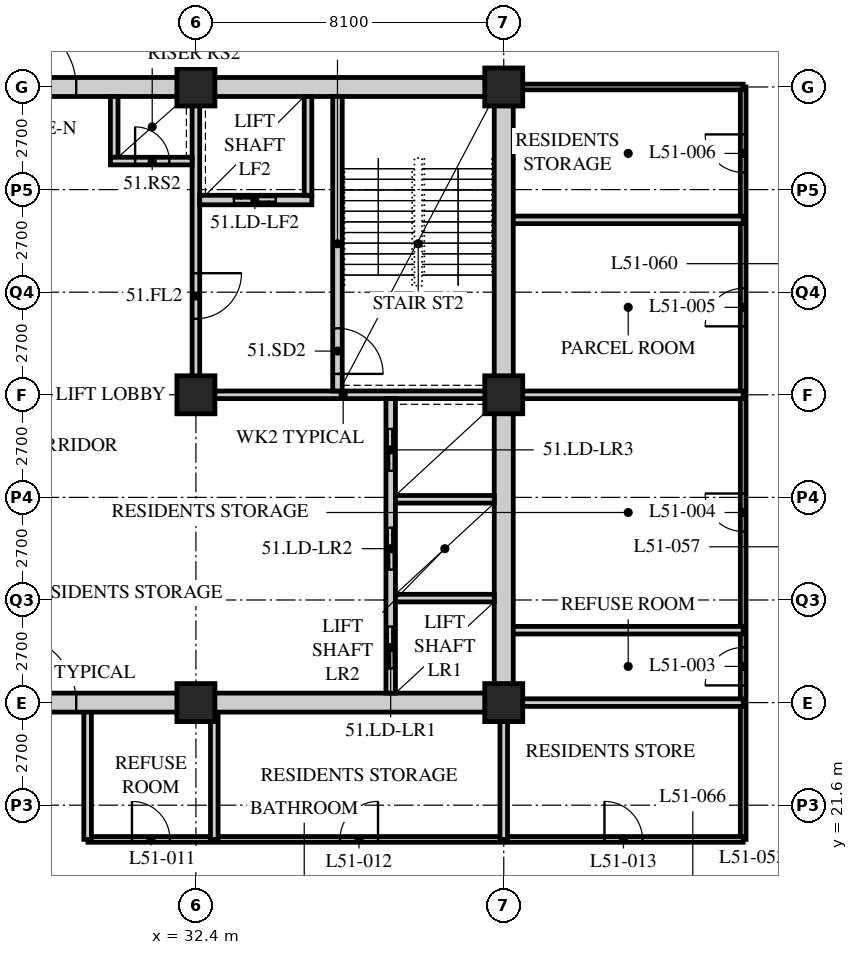
"""IFC4 building model, lengths in metres.
Left out: names, types, materials, properties, quantities, classifications, styles, units other than length and angle.
Written with IfcOpenShell. Run it as: python <this file> out.ifc"""

import sys

from ifc_helpers import new_model, si_unit, direction, frame, frame_2d, origin, origin_2d, place, context, subcontext, project, spatial, rectangle, hollow_rectangle, extrude, element, fill, save


model = new_model("IFC4")
c1 = context("Model", 3, precision=1e-05, world=origin(), true_north=direction((0.0, 1.0)))
c2 = subcontext(c1, "Body", "Model", "MODEL_VIEW")
j1 = project(units=[si_unit("LENGTHUNIT", "METRE"), si_unit("PLANEANGLEUNIT", "RADIAN")], contexts=[c1])
p1 = place(None, origin())
s1 = spatial("IfcSite", under=j1, at=p1, CompositionType="ELEMENT")
p2 = place(p1, origin())
s2 = spatial("IfcBuilding", under=s1, at=p2, CompositionType="ELEMENT")
p3 = place(p2, frame((0.0, 0.0, 199.2)))
s3 = spatial("IfcBuildingStorey", under=s2, at=p3, CompositionType="ELEMENT", Elevation=199.2)
for number, where, z_axis, x_axis in (
    (1, (32.4, 24.3, 0.0), (0.0, 0.0, 1.0), (1.0, 0.0, 0.0)),
    (2, (32.4, 32.4, 0.0), (0.0, 0.0, 1.0), (1.0, 0.0, 0.0)),
    (3, (32.4, 40.5, 0.0), (0.0, 0.0, 1.0), (1.0, 0.0, 0.0)),
    (4, (40.5, 24.3, 0.0), (0.0, 0.0, 1.0), (1.0, 0.0, 0.0)),
    (5, (40.5, 32.4, 0.0), (0.0, 0.0, 1.0), (1.0, 0.0, 0.0)),
    (6, (40.5, 40.5, 0.0), (0.0, 0.0, 1.0), (1.0, 0.0, 0.0)),
):
    element("IfcColumn", number, at=place(p3, frame(where, z_axis=z_axis, x_axis=x_axis)), inside=s3, PredefinedType="COLUMN", context=c2, shape_type="SweptSolid", body=[
        extrude(hollow_rectangle(XDim=1.0, YDim=1.0, WallThickness=0.1, at=origin_2d()), origin(), (0.0, 0.0, 1.0), 3.6),
    ])
p4 = place(p3, frame((46.8, 20.7, 0.0), z_axis=(0.0, 0.0, 1.0), x_axis=(0.0, 1.0, 0.0)))
e7 = element("IfcWall", 7, at=p4, inside=s3, PredefinedType="PARTITIONING", context=c2, shape_type="SweptSolid", body=[
    extrude(rectangle(XDim=19.8, YDim=0.15, at=frame_2d((9.9, 0.0))), origin(), (0.0, 0.0, 1.0), 3.39),
])
p5 = place(p4, frame((4.052, 0.0, 0.0)))
e8 = element("IfcOpeningElement", 8, at=p5, cuts=e7, PredefinedType="OPENING", context=c2, shape_type="SweptSolid", body=[
    extrude(rectangle(XDim=1.0, YDim=2.1, at=frame_2d((0.5, 1.05))), frame((0.0, 0.085, 0.0), z_axis=(0.0, -1.0, 0.0), x_axis=(1.0, 0.0, 0.0)), (0.0, 0.0, 1.0), 0.17),
])
p6 = place(p4, frame((8.102, 0.0, 0.0)))
e9 = element("IfcOpeningElement", 9, at=p6, cuts=e7, PredefinedType="OPENING", context=c2, shape_type="SweptSolid", body=[
    extrude(rectangle(XDim=1.0, YDim=2.1, at=frame_2d((0.5, 1.05))), frame((0.0, 0.085, 0.0), z_axis=(0.0, -1.0, 0.0), x_axis=(1.0, 0.0, 0.0)), (0.0, 0.0, 1.0), 0.17),
])
p7 = place(p4, frame((13.502, 0.0, 0.0)))
e10 = element("IfcOpeningElement", 10, at=p7, cuts=e7, PredefinedType="OPENING", context=c2, shape_type="SweptSolid", body=[
    extrude(rectangle(XDim=1.0, YDim=2.1, at=frame_2d((0.5, 1.05))), frame((0.0, 0.085, 0.0), z_axis=(0.0, -1.0, 0.0), x_axis=(1.0, 0.0, 0.0)), (0.0, 0.0, 1.0), 0.17),
])
p8 = place(p4, frame((17.552, 0.0, 0.0)))
e11 = element("IfcOpeningElement", 11, at=p8, cuts=e7, PredefinedType="OPENING", context=c2, shape_type="SweptSolid", body=[
    extrude(rectangle(XDim=1.0, YDim=2.1, at=frame_2d((0.5, 1.05))), frame((0.0, 0.085, 0.0), z_axis=(0.0, -1.0, 0.0), x_axis=(1.0, 0.0, 0.0)), (0.0, 0.0, 1.0), 0.17),
])
p9 = place(p3, frame((46.8, 40.5, 0.0), z_axis=(0.0, 0.0, 1.0), x_axis=(-1.0, 0.0, 0.0)))
e12 = element("IfcWall", 12, at=p9, inside=s3, PredefinedType="PARTITIONING", context=c2, shape_type="SweptSolid", body=[
    extrude(rectangle(XDim=6.1, YDim=0.15, at=frame_2d((3.05, 0.0))), origin(), (0.0, 0.0, 1.0), 3.39),
])
p10 = place(p3, frame((29.56, 20.7, 0.0), z_axis=(0.0, 0.0, 1.0), x_axis=(1.0, 0.0, 0.0)))
e13 = element("IfcWall", 13, at=p10, inside=s3, PredefinedType="PARTITIONING", context=c2, shape_type="SweptSolid", body=[
    extrude(rectangle(XDim=17.24, YDim=0.15, at=frame_2d((8.62, 0.0))), origin(), (0.0, 0.0, 1.0), 3.39),
])
p11 = place(p10, frame((1.157, 0.0, 0.0)))
e14 = element("IfcOpeningElement", 14, at=p11, cuts=e13, PredefinedType="OPENING", context=c2, shape_type="SweptSolid", body=[
    extrude(rectangle(XDim=1.0, YDim=2.1, at=frame_2d((0.5, 1.05))), frame((0.0, 0.085, 0.0), z_axis=(0.0, -1.0, 0.0), x_axis=(1.0, 0.0, 0.0)), (0.0, 0.0, 1.0), 0.17),
])
p12 = place(p10, frame((6.632, 0.0, 0.0)))
e15 = element("IfcOpeningElement", 15, at=p12, cuts=e13, PredefinedType="OPENING", context=c2, shape_type="SweptSolid", body=[
    extrude(rectangle(XDim=1.0, YDim=2.1, at=frame_2d((0.5, 1.05))), frame((0.0, 0.085, 0.0), z_axis=(0.0, -1.0, 0.0), x_axis=(1.0, 0.0, 0.0)), (0.0, 0.0, 1.0), 0.17),
])
p13 = place(p10, frame((13.59, 0.0, 0.0)))
e16 = element("IfcOpeningElement", 16, at=p13, cuts=e13, PredefinedType="OPENING", context=c2, shape_type="SweptSolid", body=[
    extrude(rectangle(XDim=1.0, YDim=2.1, at=frame_2d((0.5, 1.05))), frame((0.0, 0.085, 0.0), z_axis=(0.0, -1.0, 0.0), x_axis=(1.0, 0.0, 0.0)), (0.0, 0.0, 1.0), 0.17),
])
for number, where, z_axis, x_axis in (
    (17, (40.5, 32.4, 0.0), (0.0, 0.0, 1.0), (1.0, 0.0, 0.0)),
    (18, (46.8, 26.205, 0.0), (0.0, 0.0, 1.0), (-1.0, 0.0, 0.0)),
    (19, (46.8, 37.003, 0.0), (0.0, 0.0, 1.0), (-1.0, 0.0, 0.0)),
):
    element("IfcWall", number, at=place(p3, frame(where, z_axis=z_axis, x_axis=x_axis)), inside=s3, PredefinedType="SOLIDWALL", context=c2, shape_type="SweptSolid", body=[
        extrude(rectangle(XDim=6.3, YDim=0.2, at=frame_2d((3.15, 0.0))), origin(), (0.0, 0.0, 1.0), 3.39),
    ])
p14 = place(p3, frame((40.5, 20.7, 0.0), z_axis=(0.0, 0.0, 1.0), x_axis=(0.0, 1.0, 0.0)))
e20 = element("IfcWall", 20, at=p14, inside=s3, PredefinedType="SOLIDWALL", context=c2, shape_type="SweptSolid", body=[
    extrude(rectangle(XDim=3.6, YDim=0.2, at=frame_2d((1.8, 0.0))), origin(), (0.0, 0.0, 1.0), 2.778),
])
for number, where, z_axis, x_axis in (
    (21, (32.883, 20.7, 0.0), (0.0, 0.0, 1.0), (0.0, 1.0, 0.0)),
    (22, (29.55, 20.7, 0.0), (0.0, 0.0, 1.0), (0.0, 1.0, 0.0)),
):
    element("IfcWall", number, at=place(p3, frame(where, z_axis=z_axis, x_axis=x_axis)), inside=s3, PredefinedType="SOLIDWALL", context=c2, shape_type="SweptSolid", body=[
        extrude(rectangle(XDim=3.6, YDim=0.2, at=frame_2d((1.8, 0.0))), origin(), (0.0, 0.0, 1.0), 3.39),
    ])
p15 = place(p3, frame((40.5, 24.3, 0.0), z_axis=(0.0, 0.0, 1.0), x_axis=(1.0, 0.0, 0.0)))
e23 = element("IfcWall", 23, at=p15, inside=s3, PredefinedType="SOLIDWALL", context=c2, shape_type="SweptSolid", body=[
    extrude(rectangle(XDim=6.3, YDim=0.2, at=frame_2d((3.15, 0.0))), origin(), (0.0, 0.0, 1.0), 3.39),
])
p16 = place(p3, frame((15.95, 24.3, 0.0), z_axis=(0.0, 0.0, 1.0), x_axis=(1.0, 0.0, 0.0)))
e24 = element("IfcWall", 24, at=p16, inside=s3, PredefinedType="SOLIDWALL", context=c2, shape_type="SweptSolid", body=[
    extrude(rectangle(XDim=24.8, YDim=0.5, at=frame_2d((12.4, 0.0))), origin(), (0.0, 0.0, 1.0), 2.74),
])
p17 = place(p16, frame((11.5, 0.0, 0.0)))
e25 = element("IfcOpeningElement", 25, at=p17, cuts=e24, PredefinedType="OPENING", context=c2, shape_type="SweptSolid", body=[
    extrude(rectangle(XDim=1.8, YDim=2.4, at=frame_2d((0.9, 1.2))), frame((0.0, 0.26, 0.0), z_axis=(0.0, -1.0, 0.0), x_axis=(1.0, 0.0, 0.0)), (0.0, 0.0, 1.0), 0.52),
])
p18 = place(p3, frame((15.95, 40.5, 0.0), z_axis=(0.0, 0.0, 1.0), x_axis=(1.0, 0.0, 0.0)))
e26 = element("IfcWall", 26, at=p18, inside=s3, PredefinedType="SOLIDWALL", context=c2, shape_type="SweptSolid", body=[
    extrude(rectangle(XDim=24.8, YDim=0.5, at=frame_2d((12.4, 0.0))), origin(), (0.0, 0.0, 1.0), 2.74),
])
p19 = place(p18, frame((11.5, 0.0, 0.0)))
e27 = element("IfcOpeningElement", 27, at=p19, cuts=e26, PredefinedType="OPENING", context=c2, shape_type="SweptSolid", body=[
    extrude(rectangle(XDim=1.8, YDim=2.4, at=frame_2d((0.9, 1.2))), frame((0.0, 0.26, 0.0), z_axis=(0.0, -1.0, 0.0), x_axis=(1.0, 0.0, 0.0)), (0.0, 0.0, 1.0), 0.52),
])
p20 = place(p3, frame((40.5, 24.55, 0.0), z_axis=(0.0, 0.0, 1.0), x_axis=(0.0, 1.0, 0.0)))
e28 = element("IfcWall", 28, at=p20, inside=s3, PredefinedType="SOLIDWALL", context=c2, shape_type="SweptSolid", body=[
    extrude(rectangle(XDim=15.7, YDim=0.5, at=frame_2d((7.85, 0.0))), origin(), (0.0, 0.0, 1.0), 2.778),
])
p21 = place(p3, frame((32.3, 32.4, 0.0), z_axis=(0.0, 0.0, 1.0), x_axis=(1.0, 0.0, 0.0)))
e29 = element("IfcWall", 29, at=p21, inside=s3, PredefinedType="SOLIDWALL", context=c2, shape_type="SweptSolid", body=[
    extrude(rectangle(XDim=7.95, YDim=0.2, at=frame_2d((3.975, 0.0))), origin(), (0.0, 0.0, 1.0), 2.778),
])
p22 = place(p3, frame((32.4, 32.5, 0.0), z_axis=(0.0, 0.0, 1.0), x_axis=(0.0, 1.0, 0.0)))
e30 = element("IfcWall", 30, at=p22, inside=s3, PredefinedType="SOLIDWALL", context=c2, shape_type="SweptSolid", body=[
    extrude(rectangle(XDim=7.75, YDim=0.2, at=frame_2d((3.875, 0.0))), origin(), (0.0, 0.0, 1.0), 2.778),
])
p23 = place(p22, frame((1.9, 0.0, 0.0)))
e31 = element("IfcOpeningElement", 31, at=p23, cuts=e30, PredefinedType="OPENING", context=c2, shape_type="SweptSolid", body=[
    extrude(rectangle(XDim=1.2, YDim=2.1, at=frame_2d((0.6, 1.05))), frame((0.0, 0.11, 0.0), z_axis=(0.0, -1.0, 0.0), x_axis=(1.0, 0.0, 0.0)), (0.0, 0.0, 1.0), 0.22),
])
p24 = place(p3, frame((37.525, 24.55, 0.0), z_axis=(0.0, 0.0, 1.0), x_axis=(0.0, 1.0, 0.0)))
e32 = element("IfcWall", 32, at=p24, inside=s3, PredefinedType="SOLIDWALL", context=c2, shape_type="SweptSolid", body=[
    extrude(rectangle(XDim=7.75, YDim=0.25, at=frame_2d((3.875, 0.0))), origin(), (0.0, 0.0, 1.0), 3.39),
])
p25 = place(p24, frame((0.65, 0.0, 0.0)))
e33 = element("IfcOpeningElement", 33, at=p25, cuts=e32, PredefinedType="OPENING", context=c2, shape_type="SweptSolid", body=[
    extrude(rectangle(XDim=1.1, YDim=2.4, at=frame_2d((0.55, 1.2))), frame((0.0, 0.135, 0.0), z_axis=(0.0, -1.0, 0.0), x_axis=(1.0, 0.0, 0.0)), (0.0, 0.0, 1.0), 0.27),
])
p26 = place(p24, frame((3.25, 0.0, 0.0)))
e34 = element("IfcOpeningElement", 34, at=p26, cuts=e32, PredefinedType="OPENING", context=c2, shape_type="SweptSolid", body=[
    extrude(rectangle(XDim=1.1, YDim=2.4, at=frame_2d((0.55, 1.2))), frame((0.0, 0.135, 0.0), z_axis=(0.0, -1.0, 0.0), x_axis=(1.0, 0.0, 0.0)), (0.0, 0.0, 1.0), 0.27),
])
p27 = place(p24, frame((5.85, 0.0, 0.0)))
e35 = element("IfcOpeningElement", 35, at=p27, cuts=e32, PredefinedType="OPENING", context=c2, shape_type="SweptSolid", body=[
    extrude(rectangle(XDim=1.1, YDim=2.4, at=frame_2d((0.55, 1.2))), frame((0.0, 0.135, 0.0), z_axis=(0.0, -1.0, 0.0), x_axis=(1.0, 0.0, 0.0)), (0.0, 0.0, 1.0), 0.27),
])
for number, where, z_axis, x_axis in (
    (36, (37.65, 27.05, 0.0), (0.0, 0.0, 1.0), (1.0, 0.0, 0.0)),
    (37, (37.65, 29.65, 0.0), (0.0, 0.0, 1.0), (1.0, 0.0, 0.0)),
):
    element("IfcWall", number, at=place(p3, frame(where, z_axis=z_axis, x_axis=x_axis)), inside=s3, PredefinedType="SOLIDWALL", context=c2, shape_type="SweptSolid", body=[
        extrude(rectangle(XDim=2.6, YDim=0.2, at=frame_2d((1.3, 0.0))), origin(), (0.0, 0.0, 1.0), 3.39),
    ])
p28 = place(p3, frame((36.125, 32.5, 0.0), z_axis=(0.0, 0.0, 1.0), x_axis=(0.0, 1.0, 0.0)))
e38 = element("IfcWall", 38, at=p28, inside=s3, PredefinedType="SOLIDWALL", context=c2, shape_type="SweptSolid", body=[
    extrude(rectangle(XDim=7.75, YDim=0.25, at=frame_2d((3.875, 0.0))), origin(), (0.0, 0.0, 1.0), 3.39),
])
p29 = place(p28, frame((0.45, 0.0, 0.0)))
e39 = element("IfcOpeningElement", 39, at=p29, cuts=e38, PredefinedType="OPENING", context=c2, shape_type="SweptSolid", body=[
    extrude(rectangle(XDim=1.2, YDim=2.1, at=frame_2d((0.6, 1.05))), frame((0.0, 0.135, 0.0), z_axis=(0.0, -1.0, 0.0), x_axis=(1.0, 0.0, 0.0)), (0.0, 0.0, 1.0), 0.27),
])
p30 = place(p3, frame((32.5, 37.525, 0.0), z_axis=(0.0, 0.0, 1.0), x_axis=(1.0, 0.0, 0.0)))
e40 = element("IfcWall", 40, at=p30, inside=s3, PredefinedType="SOLIDWALL", context=c2, shape_type="SweptSolid", body=[
    extrude(rectangle(XDim=2.95, YDim=0.25, at=frame_2d((1.475, 0.0))), origin(), (0.0, 0.0, 1.0), 3.39),
])
p31 = place(p30, frame((0.9, 0.0, 0.0)))
e41 = element("IfcOpeningElement", 41, at=p31, cuts=e40, PredefinedType="OPENING", context=c2, shape_type="SweptSolid", body=[
    extrude(rectangle(XDim=1.1, YDim=2.4, at=frame_2d((0.55, 1.2))), frame((0.0, 0.135, 0.0), z_axis=(0.0, -1.0, 0.0), x_axis=(1.0, 0.0, 0.0)), (0.0, 0.0, 1.0), 0.27),
])
p32 = place(p3, frame((35.35, 37.65, 0.0), z_axis=(0.0, 0.0, 1.0), x_axis=(0.0, 1.0, 0.0)))
e42 = element("IfcWall", 42, at=p32, inside=s3, PredefinedType="SOLIDWALL", context=c2, shape_type="SweptSolid", body=[
    extrude(rectangle(XDim=2.6, YDim=0.2, at=frame_2d((1.3, 0.0))), origin(), (0.0, 0.0, 1.0), 3.39),
])
p33 = place(p3, frame((30.25, 38.65, 0.0), z_axis=(0.0, 0.0, 1.0), x_axis=(0.0, 1.0, 0.0)))
e43 = element("IfcWall", 43, at=p33, inside=s3, PredefinedType="SOLIDWALL", context=c2, shape_type="SweptSolid", body=[
    extrude(rectangle(XDim=1.6, YDim=0.2, at=frame_2d((0.8, 0.0))), origin(), (0.0, 0.0, 1.0), 3.39),
])
p34 = place(p3, frame((30.15, 38.55, 0.0), z_axis=(0.0, 0.0, 1.0), x_axis=(1.0, 0.0, 0.0)))
e44 = element("IfcWall", 44, at=p34, inside=s3, PredefinedType="SOLIDWALL", context=c2, shape_type="SweptSolid", body=[
    extrude(rectangle(XDim=2.15, YDim=0.2, at=frame_2d((1.075, 0.0))), origin(), (0.0, 0.0, 1.0), 3.39),
])
p35 = place(p34, frame((0.65, 0.0, 0.0)))
e45 = element("IfcOpeningElement", 45, at=p35, cuts=e44, PredefinedType="OPENING", context=c2, shape_type="SweptSolid", body=[
    extrude(rectangle(XDim=0.9, YDim=2.1, at=frame_2d((0.45, 1.05))), frame((0.0, 0.11, 0.0), z_axis=(0.0, -1.0, 0.0), x_axis=(1.0, 0.0, 0.0)), (0.0, 0.0, 1.0), 0.22),
])
p36 = place(p5, origin())
e46 = element("IfcDoor", 46, at=p36, inside=s3, OperationType="SINGLE_SWING_LEFT", PredefinedType="DOOR", context=c2, shape_type="SweptSolid", body=[
    extrude(rectangle(XDim=1.0, YDim=2.1, at=frame_2d((0.5, 1.05))), frame((0.0, 0.025, 0.0), z_axis=(0.0, -1.0, 0.0), x_axis=(1.0, 0.0, 0.0)), (0.0, 0.0, 1.0), 0.05),
])
fill(e8, e46)
p37 = place(p6, origin())
e47 = element("IfcDoor", 47, at=p37, inside=s3, OperationType="SINGLE_SWING_RIGHT", PredefinedType="DOOR", context=c2, shape_type="SweptSolid", body=[
    extrude(rectangle(XDim=1.0, YDim=2.1, at=frame_2d((0.5, 1.05))), frame((0.0, 0.025, 0.0), z_axis=(0.0, -1.0, 0.0), x_axis=(1.0, 0.0, 0.0)), (0.0, 0.0, 1.0), 0.05),
])
fill(e9, e47)
p38 = place(p7, origin())
e48 = element("IfcDoor", 48, at=p38, inside=s3, OperationType="SINGLE_SWING_LEFT", PredefinedType="DOOR", context=c2, shape_type="SweptSolid", body=[
    extrude(rectangle(XDim=1.0, YDim=2.1, at=frame_2d((0.5, 1.05))), frame((0.0, 0.025, 0.0), z_axis=(0.0, -1.0, 0.0), x_axis=(1.0, 0.0, 0.0)), (0.0, 0.0, 1.0), 0.05),
])
fill(e10, e48)
p39 = place(p8, origin())
e49 = element("IfcDoor", 49, at=p39, inside=s3, OperationType="SINGLE_SWING_RIGHT", PredefinedType="DOOR", context=c2, shape_type="SweptSolid", body=[
    extrude(rectangle(XDim=1.0, YDim=2.1, at=frame_2d((0.5, 1.05))), frame((0.0, 0.025, 0.0), z_axis=(0.0, -1.0, 0.0), x_axis=(1.0, 0.0, 0.0)), (0.0, 0.0, 1.0), 0.05),
])
fill(e11, e49)
p40 = place(p11, origin())
e50 = element("IfcDoor", 50, at=p40, inside=s3, OperationType="SINGLE_SWING_LEFT", PredefinedType="DOOR", context=c2, shape_type="SweptSolid", body=[
    extrude(rectangle(XDim=1.0, YDim=2.1, at=frame_2d((0.5, 1.05))), frame((0.0, 0.025, 0.0), z_axis=(0.0, -1.0, 0.0), x_axis=(1.0, 0.0, 0.0)), (0.0, 0.0, 1.0), 0.05),
])
fill(e14, e50)
p41 = place(p12, origin())
e51 = element("IfcDoor", 51, at=p41, inside=s3, OperationType="SINGLE_SWING_RIGHT", PredefinedType="DOOR", context=c2, shape_type="SweptSolid", body=[
    extrude(rectangle(XDim=1.0, YDim=2.1, at=frame_2d((0.5, 1.05))), frame((0.0, 0.025, 0.0), z_axis=(0.0, -1.0, 0.0), x_axis=(1.0, 0.0, 0.0)), (0.0, 0.0, 1.0), 0.05),
])
fill(e15, e51)
p42 = place(p13, origin())
e52 = element("IfcDoor", 52, at=p42, inside=s3, OperationType="SINGLE_SWING_LEFT", PredefinedType="DOOR", context=c2, shape_type="SweptSolid", body=[
    extrude(rectangle(XDim=1.0, YDim=2.1, at=frame_2d((0.5, 1.05))), frame((0.0, 0.025, 0.0), z_axis=(0.0, -1.0, 0.0), x_axis=(1.0, 0.0, 0.0)), (0.0, 0.0, 1.0), 0.05),
])
fill(e16, e52)
p43 = place(p29, origin())
e53 = element("IfcDoor", 53, at=p43, inside=s3, OperationType="SINGLE_SWING_RIGHT", PredefinedType="DOOR", context=c2, shape_type="SweptSolid", body=[
    extrude(rectangle(XDim=1.2, YDim=2.1, at=frame_2d((0.6, 1.05))), frame((0.0, 0.025, 0.0), z_axis=(0.0, -1.0, 0.0), x_axis=(1.0, 0.0, 0.0)), (0.0, 0.0, 1.0), 0.05),
])
fill(e39, e53)
p44 = place(p23, origin())
e54 = element("IfcDoor", 54, at=p44, inside=s3, OperationType="SINGLE_SWING_LEFT", PredefinedType="DOOR", context=c2, shape_type="SweptSolid", body=[
    extrude(rectangle(XDim=1.2, YDim=2.1, at=frame_2d((0.6, 1.05))), frame((0.0, 0.025, 0.0), z_axis=(0.0, -1.0, 0.0), x_axis=(1.0, 0.0, 0.0)), (0.0, 0.0, 1.0), 0.05),
])
fill(e31, e54)
p45 = place(p35, origin())
e55 = element("IfcDoor", 55, at=p45, inside=s3, OperationType="SINGLE_SWING_LEFT", PredefinedType="DOOR", context=c2, shape_type="SweptSolid", body=[
    extrude(rectangle(XDim=0.9, YDim=2.1, at=frame_2d((0.45, 1.05))), frame((0.0, 0.025, 0.0), z_axis=(0.0, -1.0, 0.0), x_axis=(1.0, 0.0, 0.0)), (0.0, 0.0, 1.0), 0.05),
])
fill(e45, e55)
p46 = place(p25, origin())
e56 = element("IfcDoor", 56, at=p46, inside=s3, OperationType="DOUBLE_DOOR_SLIDING", PredefinedType="DOOR", context=c2, shape_type="SweptSolid", body=[
    extrude(rectangle(XDim=1.1, YDim=2.4, at=frame_2d((0.55, 1.2))), frame((0.0, 0.025, 0.0), z_axis=(0.0, -1.0, 0.0), x_axis=(1.0, 0.0, 0.0)), (0.0, 0.0, 1.0), 0.05),
])
fill(e33, e56)
p47 = place(p26, origin())
e57 = element("IfcDoor", 57, at=p47, inside=s3, OperationType="DOUBLE_DOOR_SLIDING", PredefinedType="DOOR", context=c2, shape_type="SweptSolid", body=[
    extrude(rectangle(XDim=1.1, YDim=2.4, at=frame_2d((0.55, 1.2))), frame((0.0, 0.025, 0.0), z_axis=(0.0, -1.0, 0.0), x_axis=(1.0, 0.0, 0.0)), (0.0, 0.0, 1.0), 0.05),
])
fill(e34, e57)
p48 = place(p27, origin())
e58 = element("IfcDoor", 58, at=p48, inside=s3, OperationType="DOUBLE_DOOR_SLIDING", PredefinedType="DOOR", context=c2, shape_type="SweptSolid", body=[
    extrude(rectangle(XDim=1.1, YDim=2.4, at=frame_2d((0.55, 1.2))), frame((0.0, 0.025, 0.0), z_axis=(0.0, -1.0, 0.0), x_axis=(1.0, 0.0, 0.0)), (0.0, 0.0, 1.0), 0.05),
])
fill(e35, e58)
p49 = place(p31, origin())
e59 = element("IfcDoor", 59, at=p49, inside=s3, OperationType="DOUBLE_DOOR_SLIDING", PredefinedType="DOOR", context=c2, shape_type="SweptSolid", body=[
    extrude(rectangle(XDim=1.1, YDim=2.4, at=frame_2d((0.55, 1.2))), frame((0.0, 0.025, 0.0), z_axis=(0.0, -1.0, 0.0), x_axis=(1.0, 0.0, 0.0)), (0.0, 0.0, 1.0), 0.05),
])
fill(e41, e59)
p50 = place(p17, origin())
e60 = element("IfcDoor", 60, at=p50, inside=s3, OperationType="DOUBLE_DOOR_SINGLE_SWING", PredefinedType="DOOR", context=c2, shape_type="SweptSolid", body=[
    extrude(rectangle(XDim=1.8, YDim=2.4, at=frame_2d((0.9, 1.2))), frame((0.0, 0.025, 0.0), z_axis=(0.0, -1.0, 0.0), x_axis=(1.0, 0.0, 0.0)), (0.0, 0.0, 1.0), 0.05),
])
fill(e25, e60)
p51 = place(p19, origin())
e61 = element("IfcDoor", 61, at=p51, inside=s3, OperationType="DOUBLE_DOOR_SINGLE_SWING", PredefinedType="DOOR", context=c2, shape_type="SweptSolid", body=[
    extrude(rectangle(XDim=1.8, YDim=2.4, at=frame_2d((0.9, 1.2))), frame((0.0, 0.025, 0.0), z_axis=(0.0, -1.0, 0.0), x_axis=(1.0, 0.0, 0.0)), (0.0, 0.0, 1.0), 0.05),
])
fill(e27, e61)
save(model, sys.argv[1])
